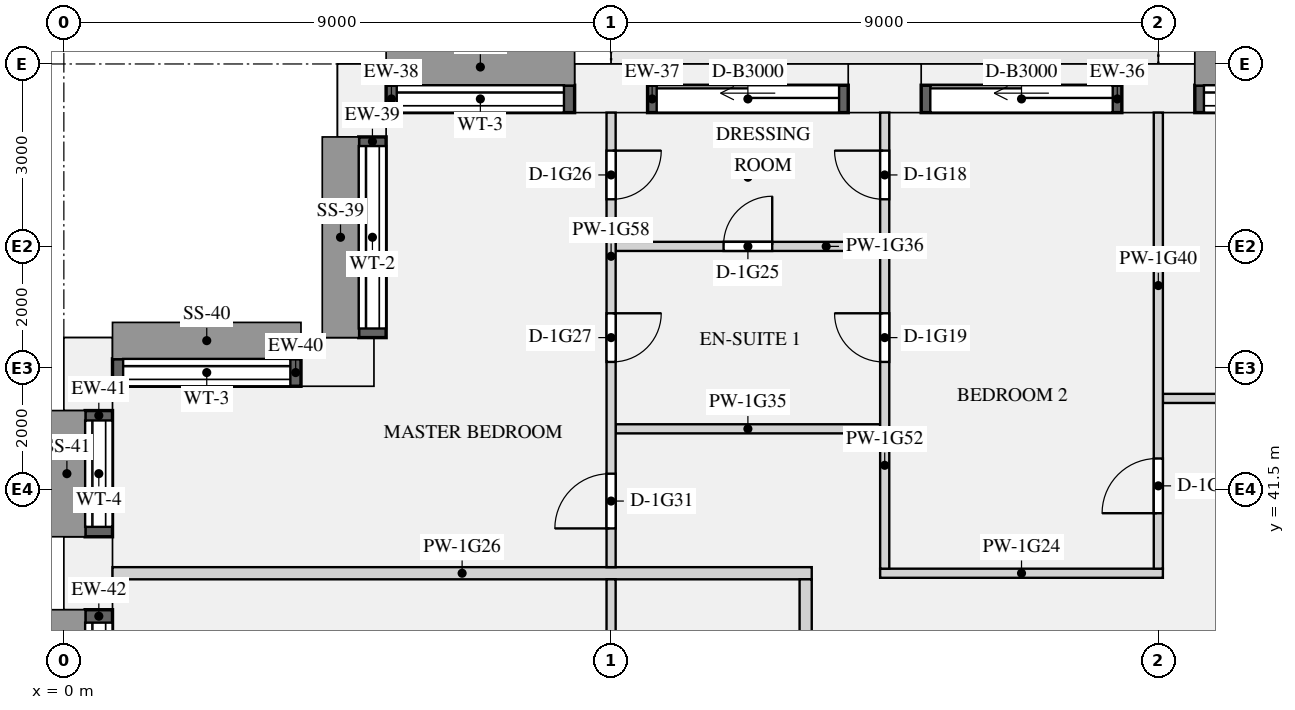
"""IFC4 building model, lengths in metres.
Left out: names, types, materials, properties, quantities, classifications, styles, units other than length and angle.
Written with IfcOpenShell. Run it as: python <this file> out.ifc"""

import sys

from ifc_helpers import new_model, si_unit, direction, frame, frame_2d, origin, origin_2d, place, context, subcontext, project, spatial, rectangle, extrude, element, fill, save


model = new_model("IFC4")
c1 = context("Model", 3, precision=1e-05, world=origin(), true_north=direction((0.0, 1.0)))
c2 = subcontext(c1, "Body", "Model", "MODEL_VIEW")
j1 = project(units=[si_unit("LENGTHUNIT", "METRE"), si_unit("PLANEANGLEUNIT", "RADIAN")], contexts=[c1])
p1 = place(None, origin())
s1 = spatial("IfcSite", under=j1, at=p1, CompositionType="ELEMENT")
p2 = place(p1, origin())
s2 = spatial("IfcBuilding", under=s1, at=p2, CompositionType="ELEMENT")
p3 = place(p2, frame((0.0, 0.0, 69.9)))
s3 = spatial("IfcBuildingStorey", under=s2, at=p3, CompositionType="ELEMENT", Elevation=69.9)
for number, where, z_axis, x_axis in (
    (1, (18.0, 48.1, 0.0), (0.0, 0.0, 1.0), (-1.0, 0.0, 0.0)),
    (2, (13.5, 48.1, 0.0), (0.0, 0.0, 1.0), (-1.0, 0.0, 0.0)),
    (3, (9.0, 48.1, 0.0), (0.0, 0.0, 1.0), (-1.0, 0.0, 0.0)),
):
    element("IfcColumn", number, at=place(p3, frame(where, z_axis=z_axis, x_axis=x_axis)), inside=s3, PredefinedType="USERDEFINED", context=c2, shape_type="SweptSolid", body=[
        extrude(rectangle(XDim=1.2, YDim=0.8, at=origin_2d()), origin(), (0.0, 0.0, 1.0), 2.65),
    ])
p4 = place(p3, frame((4.9, 47.9, 0.0), z_axis=(0.0, 0.0, 1.0), x_axis=(0.0, -1.0, 0.0)))
e4 = element("IfcColumn", 4, at=p4, inside=s3, PredefinedType="USERDEFINED", context=c2, shape_type="SweptSolid", body=[
    extrude(rectangle(XDim=1.2, YDim=0.8, at=origin_2d()), origin(), (0.0, 0.0, 1.0), 3.15),
])
p5 = place(p3, frame((4.5, 43.6, 0.0), z_axis=(0.0, 0.0, 1.0), x_axis=(-1.0, 0.0, 0.0)))
e5 = element("IfcColumn", 5, at=p5, inside=s3, PredefinedType="USERDEFINED", context=c2, shape_type="SweptSolid", body=[
    extrude(rectangle(XDim=1.2, YDim=0.8, at=origin_2d()), origin(), (0.0, 0.0, 1.0), 2.65),
])
p6 = place(p3, frame((0.4, 43.4, 0.0), z_axis=(0.0, 0.0, 1.0), x_axis=(0.0, -1.0, 0.0)))
e6 = element("IfcColumn", 6, at=p6, inside=s3, PredefinedType="USERDEFINED", context=c2, shape_type="SweptSolid", body=[
    extrude(rectangle(XDim=1.2, YDim=0.8, at=origin_2d()), origin(), (0.0, 0.0, 1.0), 3.15),
])
p7 = place(p3, frame((0.4, 40.125, 0.0), z_axis=(0.0, 0.0, 1.0), x_axis=(0.0, -1.0, 0.0)))
e7 = element("IfcColumn", 7, at=p7, inside=s3, PredefinedType="USERDEFINED", context=c2, shape_type="SweptSolid", body=[
    extrude(rectangle(XDim=1.2, YDim=0.8, at=origin_2d()), origin(), (0.0, 0.0, 1.0), 2.65),
])
p8 = place(p3, frame((21.9, 47.925, 0.9), z_axis=(0.0, 0.0, 1.0), x_axis=(-1.0, 0.0, 0.0)))
e8 = element("IfcWall", 8, at=p8, inside=s3, PredefinedType="SOLIDWALL", context=c2, shape_type="SweptSolid", body=[
    extrude(rectangle(XDim=3.3, YDim=0.45, at=frame_2d((1.65, 0.0))), origin(), (0.0, 0.0, 1.0), 1.75),
])
p9 = place(p8, frame((0.15, 0.0, 0.15)))
e9 = element("IfcOpeningElement", 9, at=p9, cuts=e8, PredefinedType="OPENING", context=c2, shape_type="SweptSolid", body=[
    extrude(rectangle(XDim=3.0, YDim=1.5, at=frame_2d((1.5, 0.75))), frame((0.0, 0.235, 0.0), z_axis=(0.0, -1.0, 0.0), x_axis=(1.0, 0.0, 0.0)), (0.0, 0.0, 1.0), 0.47),
])
p10 = place(p3, frame((17.4, 47.925, 0.0), z_axis=(0.0, 0.0, 1.0), x_axis=(-1.0, 0.0, 0.0)))
e10 = element("IfcWall", 10, at=p10, inside=s3, PredefinedType="SOLIDWALL", context=c2, shape_type="SweptSolid", body=[
    extrude(rectangle(XDim=3.3, YDim=0.45, at=frame_2d((1.65, 0.0))), origin(), (0.0, 0.0, 1.0), 2.65),
])
p11 = place(p10, frame((0.15, 0.0, 0.0)))
e11 = element("IfcOpeningElement", 11, at=p11, cuts=e10, PredefinedType="OPENING", context=c2, shape_type="SweptSolid", body=[
    extrude(rectangle(XDim=3.0, YDim=2.3, at=frame_2d((1.5, 1.15))), frame((0.0, 0.235, 0.0), z_axis=(0.0, -1.0, 0.0), x_axis=(1.0, 0.0, 0.0)), (0.0, 0.0, 1.0), 0.47),
])
p12 = place(p3, frame((12.9, 47.925, 0.0), z_axis=(0.0, 0.0, 1.0), x_axis=(-1.0, 0.0, 0.0)))
e12 = element("IfcWall", 12, at=p12, inside=s3, PredefinedType="SOLIDWALL", context=c2, shape_type="SweptSolid", body=[
    extrude(rectangle(XDim=3.3, YDim=0.45, at=frame_2d((1.65, 0.0))), origin(), (0.0, 0.0, 1.0), 2.65),
])
p13 = place(p12, frame((0.15, 0.0, 0.0)))
e13 = element("IfcOpeningElement", 13, at=p13, cuts=e12, PredefinedType="OPENING", context=c2, shape_type="SweptSolid", body=[
    extrude(rectangle(XDim=3.0, YDim=2.3, at=frame_2d((1.5, 1.15))), frame((0.0, 0.235, 0.0), z_axis=(0.0, -1.0, 0.0), x_axis=(1.0, 0.0, 0.0)), (0.0, 0.0, 1.0), 0.47),
])
p14 = place(p3, frame((8.4, 47.925, 0.9), z_axis=(0.0, 0.0, 1.0), x_axis=(-1.0, 0.0, 0.0)))
e14 = element("IfcWall", 14, at=p14, inside=s3, PredefinedType="SOLIDWALL", context=c2, shape_type="SweptSolid", body=[
    extrude(rectangle(XDim=3.1, YDim=0.45, at=frame_2d((1.55, 0.0))), origin(), (0.0, 0.0, 1.0), 1.75),
])
p15 = place(p14, frame((0.175, 0.0, 0.15)))
e15 = element("IfcOpeningElement", 15, at=p15, cuts=e14, PredefinedType="OPENING", context=c2, shape_type="SweptSolid", body=[
    extrude(rectangle(XDim=2.75, YDim=1.5, at=frame_2d((1.375, 0.75))), frame((0.0, 0.235, 0.0), z_axis=(0.0, -1.0, 0.0), x_axis=(1.0, 0.0, 0.0)), (0.0, 0.0, 1.0), 0.47),
])
p16 = place(p3, frame((5.075, 47.3, 0.9), z_axis=(0.0, 0.0, 1.0), x_axis=(0.0, -1.0, 0.0)))
e16 = element("IfcWall", 16, at=p16, inside=s3, PredefinedType="SOLIDWALL", context=c2, shape_type="SweptSolid", body=[
    extrude(rectangle(XDim=3.3, YDim=0.45, at=frame_2d((1.65, 0.0))), origin(), (0.0, 0.0, 1.0), 1.75),
])
p17 = place(p16, frame((0.15, 0.0, 0.15)))
e17 = element("IfcOpeningElement", 17, at=p17, cuts=e16, PredefinedType="OPENING", context=c2, shape_type="SweptSolid", body=[
    extrude(rectangle(XDim=3.0, YDim=1.5, at=frame_2d((1.5, 0.75))), frame((0.0, 0.235, 0.0), z_axis=(0.0, -1.0, 0.0), x_axis=(1.0, 0.0, 0.0)), (0.0, 0.0, 1.0), 0.47),
])
p18 = place(p3, frame((3.9, 43.425, 0.9), z_axis=(0.0, 0.0, 1.0), x_axis=(-1.0, 0.0, 0.0)))
e18 = element("IfcWall", 18, at=p18, inside=s3, PredefinedType="SOLIDWALL", context=c2, shape_type="SweptSolid", body=[
    extrude(rectangle(XDim=3.1, YDim=0.45, at=frame_2d((1.55, 0.0))), origin(), (0.0, 0.0, 1.0), 1.75),
])
p19 = place(p18, frame((0.175, 0.0, 0.15)))
e19 = element("IfcOpeningElement", 19, at=p19, cuts=e18, PredefinedType="OPENING", context=c2, shape_type="SweptSolid", body=[
    extrude(rectangle(XDim=2.75, YDim=1.5, at=frame_2d((1.375, 0.75))), frame((0.0, 0.235, 0.0), z_axis=(0.0, -1.0, 0.0), x_axis=(1.0, 0.0, 0.0)), (0.0, 0.0, 1.0), 0.47),
])
p20 = place(p3, frame((0.575, 42.8, 0.9), z_axis=(0.0, 0.0, 1.0), x_axis=(0.0, -1.0, 0.0)))
e20 = element("IfcWall", 20, at=p20, inside=s3, PredefinedType="SOLIDWALL", context=c2, shape_type="SweptSolid", body=[
    extrude(rectangle(XDim=2.075, YDim=0.45, at=frame_2d((1.038, 0.0))), origin(), (0.0, 0.0, 1.0), 1.75),
])
p21 = place(p20, frame((0.163, 0.0, 0.15)))
e21 = element("IfcOpeningElement", 21, at=p21, cuts=e20, PredefinedType="OPENING", context=c2, shape_type="SweptSolid", body=[
    extrude(rectangle(XDim=1.75, YDim=1.5, at=frame_2d((0.875, 0.75))), frame((0.0, 0.235, 0.0), z_axis=(0.0, -1.0, 0.0), x_axis=(1.0, 0.0, 0.0)), (0.0, 0.0, 1.0), 0.47),
])
p22 = place(p3, frame((0.575, 39.525, 0.9), z_axis=(0.0, 0.0, 1.0), x_axis=(0.0, -1.0, 0.0)))
e22 = element("IfcWall", 22, at=p22, inside=s3, PredefinedType="SOLIDWALL", context=c2, shape_type="SweptSolid", body=[
    extrude(rectangle(XDim=2.675, YDim=0.45, at=frame_2d((1.337, 0.0))), origin(), (0.0, 0.0, 1.0), 1.75),
])
p23 = place(p22, frame((0.212, 0.0, 0.15)))
e23 = element("IfcOpeningElement", 23, at=p23, cuts=e22, PredefinedType="OPENING", context=c2, shape_type="SweptSolid", body=[
    extrude(rectangle(XDim=2.25, YDim=1.5, at=frame_2d((1.125, 0.75))), frame((0.0, 0.235, 0.0), z_axis=(0.0, -1.0, 0.0), x_axis=(1.0, 0.0, 0.0)), (0.0, 0.0, 1.0), 0.47),
])
p24 = place(p3, frame((13.425, 40.125, 0.0), z_axis=(0.0, 0.0, 1.0), x_axis=(1.0, 0.0, 0.0)))
e24 = element("IfcWall", 24, at=p24, inside=s3, PredefinedType="PARTITIONING", context=c2, shape_type="SweptSolid", body=[
    extrude(rectangle(XDim=4.65, YDim=0.15, at=frame_2d((2.325, 0.0))), origin(), (0.0, 0.0, 1.0), 2.65),
])
p25 = place(p3, frame((0.8, 40.125, 0.0), z_axis=(0.0, 0.0, 1.0), x_axis=(1.0, 0.0, 0.0)))
e25 = element("IfcWall", 25, at=p25, inside=s3, PredefinedType="PARTITIONING", context=c2, shape_type="SweptSolid", body=[
    extrude(rectangle(XDim=11.5, YDim=0.2, at=frame_2d((5.75, 0.0))), origin(), (0.0, 0.0, 1.0), 2.65),
])
p26 = place(p3, frame((18.075, 43.0, 0.0), z_axis=(0.0, 0.0, 1.0), x_axis=(1.0, 0.0, 0.0)))
e26 = element("IfcWall", 26, at=p26, inside=s3, PredefinedType="PARTITIONING", context=c2, shape_type="SweptSolid", body=[
    extrude(rectangle(XDim=26.825, YDim=0.15, at=frame_2d((13.413, 0.0))), origin(), (0.0, 0.0, 1.0), 2.65),
])
p27 = place(p26, frame((14.925, 0.0, 0.0)))
e27 = element("IfcOpeningElement", 27, at=p27, cuts=e26, PredefinedType="OPENING", context=c2, shape_type="SweptSolid", body=[
    extrude(rectangle(XDim=1.5, YDim=2.1, at=frame_2d((0.75, 1.05))), frame((0.0, 0.085, 0.0), z_axis=(0.0, -1.0, 0.0), x_axis=(1.0, 0.0, 0.0)), (0.0, 0.0, 1.0), 0.17),
])
p28 = place(p26, frame((11.475, 0.0, 0.0)))
e28 = element("IfcOpeningElement", 28, at=p28, cuts=e26, PredefinedType="OPENING", context=c2, shape_type="SweptSolid", body=[
    extrude(rectangle(XDim=0.9, YDim=2.1, at=frame_2d((0.45, 1.05))), frame((0.0, 0.085, 0.0), z_axis=(0.0, -1.0, 0.0), x_axis=(1.0, 0.0, 0.0)), (0.0, 0.0, 1.0), 0.17),
])
p29 = place(p26, frame((2.475, 0.0, 0.0)))
e29 = element("IfcOpeningElement", 29, at=p29, cuts=e26, PredefinedType="OPENING", context=c2, shape_type="SweptSolid", body=[
    extrude(rectangle(XDim=0.9, YDim=2.1, at=frame_2d((0.45, 1.05))), frame((0.0, 0.085, 0.0), z_axis=(0.0, -1.0, 0.0), x_axis=(1.0, 0.0, 0.0)), (0.0, 0.0, 1.0), 0.17),
])
p30 = place(p26, frame((21.675, 0.0, 0.0)))
e30 = element("IfcOpeningElement", 30, at=p30, cuts=e26, PredefinedType="OPENING", context=c2, shape_type="SweptSolid", body=[
    extrude(rectangle(XDim=1.5, YDim=2.1, at=frame_2d((0.75, 1.05))), frame((0.0, 0.085, 0.0), z_axis=(0.0, -1.0, 0.0), x_axis=(1.0, 0.0, 0.0)), (0.0, 0.0, 1.0), 0.17),
])
p31 = place(p3, frame((9.075, 42.5, 0.0), z_axis=(0.0, 0.0, 1.0), x_axis=(1.0, 0.0, 0.0)))
e31 = element("IfcWall", 31, at=p31, inside=s3, PredefinedType="PARTITIONING", context=c2, shape_type="SweptSolid", body=[
    extrude(rectangle(XDim=4.35, YDim=0.15, at=frame_2d((2.175, 0.0))), origin(), (0.0, 0.0, 1.0), 2.65),
])
p32 = place(p3, frame((9.075, 45.5, 0.0), z_axis=(0.0, 0.0, 1.0), x_axis=(1.0, 0.0, 0.0)))
e32 = element("IfcWall", 32, at=p32, inside=s3, PredefinedType="PARTITIONING", context=c2, shape_type="SweptSolid", body=[
    extrude(rectangle(XDim=4.35, YDim=0.15, at=frame_2d((2.175, 0.0))), origin(), (0.0, 0.0, 1.0), 2.65),
])
p33 = place(p32, frame((1.775, 0.0, 0.0)))
e33 = element("IfcOpeningElement", 33, at=p33, cuts=e32, PredefinedType="OPENING", context=c2, shape_type="SweptSolid", body=[
    extrude(rectangle(XDim=0.8, YDim=2.1, at=frame_2d((0.4, 1.05))), frame((0.0, 0.085, 0.0), z_axis=(0.0, -1.0, 0.0), x_axis=(1.0, 0.0, 0.0)), (0.0, 0.0, 1.0), 0.17),
])
p34 = place(p3, frame((18.0, 40.2, 0.0), z_axis=(0.0, 0.0, 1.0), x_axis=(0.0, 1.0, 0.0)))
e34 = element("IfcWall", 34, at=p34, inside=s3, PredefinedType="PARTITIONING", context=c2, shape_type="SweptSolid", body=[
    extrude(rectangle(XDim=7.5, YDim=0.15, at=frame_2d((3.75, 0.0))), origin(), (0.0, 0.0, 1.0), 2.65),
])
p35 = place(p34, frame((0.912, 0.0, 0.0)))
e35 = element("IfcOpeningElement", 35, at=p35, cuts=e34, PredefinedType="OPENING", context=c2, shape_type="SweptSolid", body=[
    extrude(rectangle(XDim=0.9, YDim=2.1, at=frame_2d((0.45, 1.05))), frame((0.0, 0.085, 0.0), z_axis=(0.0, -1.0, 0.0), x_axis=(1.0, 0.0, 0.0)), (0.0, 0.0, 1.0), 0.17),
])
p36 = place(p3, frame((13.5, 40.2, 0.0), z_axis=(0.0, 0.0, 1.0), x_axis=(0.0, 1.0, 0.0)))
e36 = element("IfcWall", 36, at=p36, inside=s3, PredefinedType="PARTITIONING", context=c2, shape_type="SweptSolid", body=[
    extrude(rectangle(XDim=7.5, YDim=0.15, at=frame_2d((3.75, 0.0))), origin(), (0.0, 0.0, 1.0), 2.65),
])
p37 = place(p36, frame((6.075, 0.0, 0.0)))
e37 = element("IfcOpeningElement", 37, at=p37, cuts=e36, PredefinedType="OPENING", context=c2, shape_type="SweptSolid", body=[
    extrude(rectangle(XDim=0.8, YDim=2.1, at=frame_2d((0.4, 1.05))), frame((0.0, 0.085, 0.0), z_axis=(0.0, -1.0, 0.0), x_axis=(1.0, 0.0, 0.0)), (0.0, 0.0, 1.0), 0.17),
])
p38 = place(p36, frame((3.4, 0.0, 0.0)))
e38 = element("IfcOpeningElement", 38, at=p38, cuts=e36, PredefinedType="OPENING", context=c2, shape_type="SweptSolid", body=[
    extrude(rectangle(XDim=0.8, YDim=2.1, at=frame_2d((0.4, 1.05))), frame((0.0, 0.085, 0.0), z_axis=(0.0, -1.0, 0.0), x_axis=(1.0, 0.0, 0.0)), (0.0, 0.0, 1.0), 0.17),
])
p39 = place(p3, frame((9.0, 32.45, 0.0), z_axis=(0.0, 0.0, 1.0), x_axis=(0.0, 1.0, 0.0)))
e39 = element("IfcWall", 39, at=p39, inside=s3, PredefinedType="PARTITIONING", context=c2, shape_type="SweptSolid", body=[
    extrude(rectangle(XDim=7.575, YDim=0.15, at=frame_2d((3.788, 0.0))), origin(), (0.0, 0.0, 1.0), 2.65),
])
p40 = place(p39, frame((5.288, 0.0, 0.0)))
e40 = element("IfcOpeningElement", 40, at=p40, cuts=e39, PredefinedType="OPENING", context=c2, shape_type="SweptSolid", body=[
    extrude(rectangle(XDim=0.9, YDim=2.1, at=frame_2d((0.45, 1.05))), frame((0.0, 0.085, 0.0), z_axis=(0.0, -1.0, 0.0), x_axis=(1.0, 0.0, 0.0)), (0.0, 0.0, 1.0), 0.17),
])
p41 = place(p3, frame((9.0, 40.225, 0.0), z_axis=(0.0, 0.0, 1.0), x_axis=(0.0, 1.0, 0.0)))
e41 = element("IfcWall", 41, at=p41, inside=s3, PredefinedType="PARTITIONING", context=c2, shape_type="SweptSolid", body=[
    extrude(rectangle(XDim=7.475, YDim=0.15, at=frame_2d((3.737, 0.0))), origin(), (0.0, 0.0, 1.0), 2.65),
])
p42 = place(p41, frame((6.05, 0.0, 0.0)))
e42 = element("IfcOpeningElement", 42, at=p42, cuts=e41, PredefinedType="OPENING", context=c2, shape_type="SweptSolid", body=[
    extrude(rectangle(XDim=0.8, YDim=2.1, at=frame_2d((0.4, 1.05))), frame((0.0, 0.085, 0.0), z_axis=(0.0, -1.0, 0.0), x_axis=(1.0, 0.0, 0.0)), (0.0, 0.0, 1.0), 0.17),
])
p43 = place(p41, frame((3.375, 0.0, 0.0)))
e43 = element("IfcOpeningElement", 43, at=p43, cuts=e41, PredefinedType="OPENING", context=c2, shape_type="SweptSolid", body=[
    extrude(rectangle(XDim=0.8, YDim=2.1, at=frame_2d((0.4, 1.05))), frame((0.0, 0.085, 0.0), z_axis=(0.0, -1.0, 0.0), x_axis=(1.0, 0.0, 0.0)), (0.0, 0.0, 1.0), 0.17),
])
p44 = place(p41, frame((0.637, 0.0, 0.0)))
e44 = element("IfcOpeningElement", 44, at=p44, cuts=e41, PredefinedType="OPENING", context=c2, shape_type="SweptSolid", body=[
    extrude(rectangle(XDim=0.9, YDim=2.1, at=frame_2d((0.45, 1.05))), frame((0.0, 0.085, 0.0), z_axis=(0.0, -1.0, 0.0), x_axis=(1.0, 0.0, 0.0)), (0.0, 0.0, 1.0), 0.17),
])
p45 = place(p3, frame((12.2, 35.4, 0.0), z_axis=(0.0, 0.0, 1.0), x_axis=(0.0, 1.0, 0.0)))
e45 = element("IfcWall", 45, at=p45, inside=s3, PredefinedType="PARTITIONING", context=c2, shape_type="SweptSolid", body=[
    extrude(rectangle(XDim=4.625, YDim=0.2, at=frame_2d((2.312, 0.0))), origin(), (0.0, 0.0, 1.0), 2.65),
])
p46 = place(p9, origin())
e46 = element("IfcWindow", 46, at=p46, inside=s3, PartitioningType="SINGLE_PANEL", PredefinedType="WINDOW", context=c2, shape_type="SweptSolid", body=[
    extrude(rectangle(XDim=3.0, YDim=1.5, at=frame_2d((1.5, 0.75))), frame((0.0, -0.065, 0.0), z_axis=(0.0, -1.0, 0.0), x_axis=(1.0, 0.0, 0.0)), (0.0, 0.0, 1.0), 0.06),
])
fill(e9, e46)
p47 = place(p11, origin())
e47 = element("IfcDoor", 47, at=p47, inside=s3, OperationType="SLIDING_TO_LEFT", PredefinedType="DOOR", context=c2, shape_type="SweptSolid", body=[
    extrude(rectangle(XDim=3.0, YDim=2.3, at=frame_2d((1.5, 1.15))), frame((0.0, -0.07, 0.0), z_axis=(0.0, -1.0, 0.0), x_axis=(1.0, 0.0, 0.0)), (0.0, 0.0, 1.0), 0.05),
])
fill(e11, e47)
p48 = place(p13, origin())
e48 = element("IfcDoor", 48, at=p48, inside=s3, OperationType="SLIDING_TO_LEFT", PredefinedType="DOOR", context=c2, shape_type="SweptSolid", body=[
    extrude(rectangle(XDim=3.0, YDim=2.3, at=frame_2d((1.5, 1.15))), frame((0.0, -0.07, 0.0), z_axis=(0.0, -1.0, 0.0), x_axis=(1.0, 0.0, 0.0)), (0.0, 0.0, 1.0), 0.05),
])
fill(e13, e48)
p49 = place(p15, origin())
e49 = element("IfcWindow", 49, at=p49, inside=s3, PartitioningType="SINGLE_PANEL", PredefinedType="WINDOW", context=c2, shape_type="SweptSolid", body=[
    extrude(rectangle(XDim=2.75, YDim=1.5, at=frame_2d((1.375, 0.75))), frame((0.0, -0.065, 0.0), z_axis=(0.0, -1.0, 0.0), x_axis=(1.0, 0.0, 0.0)), (0.0, 0.0, 1.0), 0.06),
])
fill(e15, e49)
p50 = place(p17, origin())
e50 = element("IfcWindow", 50, at=p50, inside=s3, PartitioningType="SINGLE_PANEL", PredefinedType="WINDOW", context=c2, shape_type="SweptSolid", body=[
    extrude(rectangle(XDim=3.0, YDim=1.5, at=frame_2d((1.5, 0.75))), frame((0.0, -0.065, 0.0), z_axis=(0.0, -1.0, 0.0), x_axis=(1.0, 0.0, 0.0)), (0.0, 0.0, 1.0), 0.06),
])
fill(e17, e50)
p51 = place(p19, origin())
e51 = element("IfcWindow", 51, at=p51, inside=s3, PartitioningType="SINGLE_PANEL", PredefinedType="WINDOW", context=c2, shape_type="SweptSolid", body=[
    extrude(rectangle(XDim=2.75, YDim=1.5, at=frame_2d((1.375, 0.75))), frame((0.0, -0.065, 0.0), z_axis=(0.0, -1.0, 0.0), x_axis=(1.0, 0.0, 0.0)), (0.0, 0.0, 1.0), 0.06),
])
fill(e19, e51)
p52 = place(p21, origin())
e52 = element("IfcWindow", 52, at=p52, inside=s3, PartitioningType="SINGLE_PANEL", PredefinedType="WINDOW", context=c2, shape_type="SweptSolid", body=[
    extrude(rectangle(XDim=1.75, YDim=1.5, at=frame_2d((0.875, 0.75))), frame((0.0, -0.065, 0.0), z_axis=(0.0, -1.0, 0.0), x_axis=(1.0, 0.0, 0.0)), (0.0, 0.0, 1.0), 0.06),
])
fill(e21, e52)
p53 = place(p23, origin())
e53 = element("IfcWindow", 53, at=p53, inside=s3, PartitioningType="SINGLE_PANEL", PredefinedType="WINDOW", context=c2, shape_type="SweptSolid", body=[
    extrude(rectangle(XDim=2.25, YDim=1.5, at=frame_2d((1.125, 0.75))), frame((0.0, -0.065, 0.0), z_axis=(0.0, -1.0, 0.0), x_axis=(1.0, 0.0, 0.0)), (0.0, 0.0, 1.0), 0.06),
])
fill(e23, e53)
p54 = place(p37, origin())
e54 = element("IfcDoor", 54, at=p54, inside=s3, OperationType="SINGLE_SWING_RIGHT", PredefinedType="DOOR", context=c2, shape_type="SweptSolid", body=[
    extrude(rectangle(XDim=0.8, YDim=2.1, at=frame_2d((0.4, 1.05))), frame((0.0, 0.025, 0.0), z_axis=(0.0, -1.0, 0.0), x_axis=(1.0, 0.0, 0.0)), (0.0, 0.0, 1.0), 0.05),
])
fill(e37, e54)
p55 = place(p38, origin())
e55 = element("IfcDoor", 55, at=p55, inside=s3, OperationType="SINGLE_SWING_RIGHT", PredefinedType="DOOR", context=c2, shape_type="SweptSolid", body=[
    extrude(rectangle(XDim=0.8, YDim=2.1, at=frame_2d((0.4, 1.05))), frame((0.0, 0.025, 0.0), z_axis=(0.0, -1.0, 0.0), x_axis=(1.0, 0.0, 0.0)), (0.0, 0.0, 1.0), 0.05),
])
fill(e38, e55)
p56 = place(p35, origin())
e56 = element("IfcDoor", 56, at=p56, inside=s3, OperationType="SINGLE_SWING_LEFT", PredefinedType="DOOR", context=c2, shape_type="SweptSolid", body=[
    extrude(rectangle(XDim=0.9, YDim=2.1, at=frame_2d((0.45, 1.05))), frame((0.0, 0.025, 0.0), z_axis=(0.0, -1.0, 0.0), x_axis=(1.0, 0.0, 0.0)), (0.0, 0.0, 1.0), 0.05),
])
fill(e35, e56)
p57 = place(p33, origin())
e57 = element("IfcDoor", 57, at=p57, inside=s3, OperationType="SINGLE_SWING_RIGHT", PredefinedType="DOOR", context=c2, shape_type="SweptSolid", body=[
    extrude(rectangle(XDim=0.8, YDim=2.1, at=frame_2d((0.4, 1.05))), frame((0.0, 0.025, 0.0), z_axis=(0.0, -1.0, 0.0), x_axis=(1.0, 0.0, 0.0)), (0.0, 0.0, 1.0), 0.05),
])
fill(e33, e57)
p58 = place(p42, frame((0.8, 0.0, 0.0), z_axis=(0.0, 0.0, 1.0), x_axis=(-1.0, 0.0, 0.0)))
e58 = element("IfcDoor", 58, at=p58, inside=s3, OperationType="SINGLE_SWING_LEFT", PredefinedType="DOOR", context=c2, shape_type="SweptSolid", body=[
    extrude(rectangle(XDim=0.8, YDim=2.1, at=frame_2d((0.4, 1.05))), frame((0.0, 0.025, 0.0), z_axis=(0.0, -1.0, 0.0), x_axis=(1.0, 0.0, 0.0)), (0.0, 0.0, 1.0), 0.05),
])
fill(e42, e58)
p59 = place(p43, frame((0.8, 0.0, 0.0), z_axis=(0.0, 0.0, 1.0), x_axis=(-1.0, 0.0, 0.0)))
e59 = element("IfcDoor", 59, at=p59, inside=s3, OperationType="SINGLE_SWING_LEFT", PredefinedType="DOOR", context=c2, shape_type="SweptSolid", body=[
    extrude(rectangle(XDim=0.8, YDim=2.1, at=frame_2d((0.4, 1.05))), frame((0.0, 0.025, 0.0), z_axis=(0.0, -1.0, 0.0), x_axis=(1.0, 0.0, 0.0)), (0.0, 0.0, 1.0), 0.05),
])
fill(e43, e59)
p60 = place(p44, origin())
e60 = element("IfcDoor", 60, at=p60, inside=s3, OperationType="SINGLE_SWING_LEFT", PredefinedType="DOOR", context=c2, shape_type="SweptSolid", body=[
    extrude(rectangle(XDim=0.9, YDim=2.1, at=frame_2d((0.45, 1.05))), frame((0.0, 0.025, 0.0), z_axis=(0.0, -1.0, 0.0), x_axis=(1.0, 0.0, 0.0)), (0.0, 0.0, 1.0), 0.05),
])
fill(e44, e60)
save(model, sys.argv[1])
